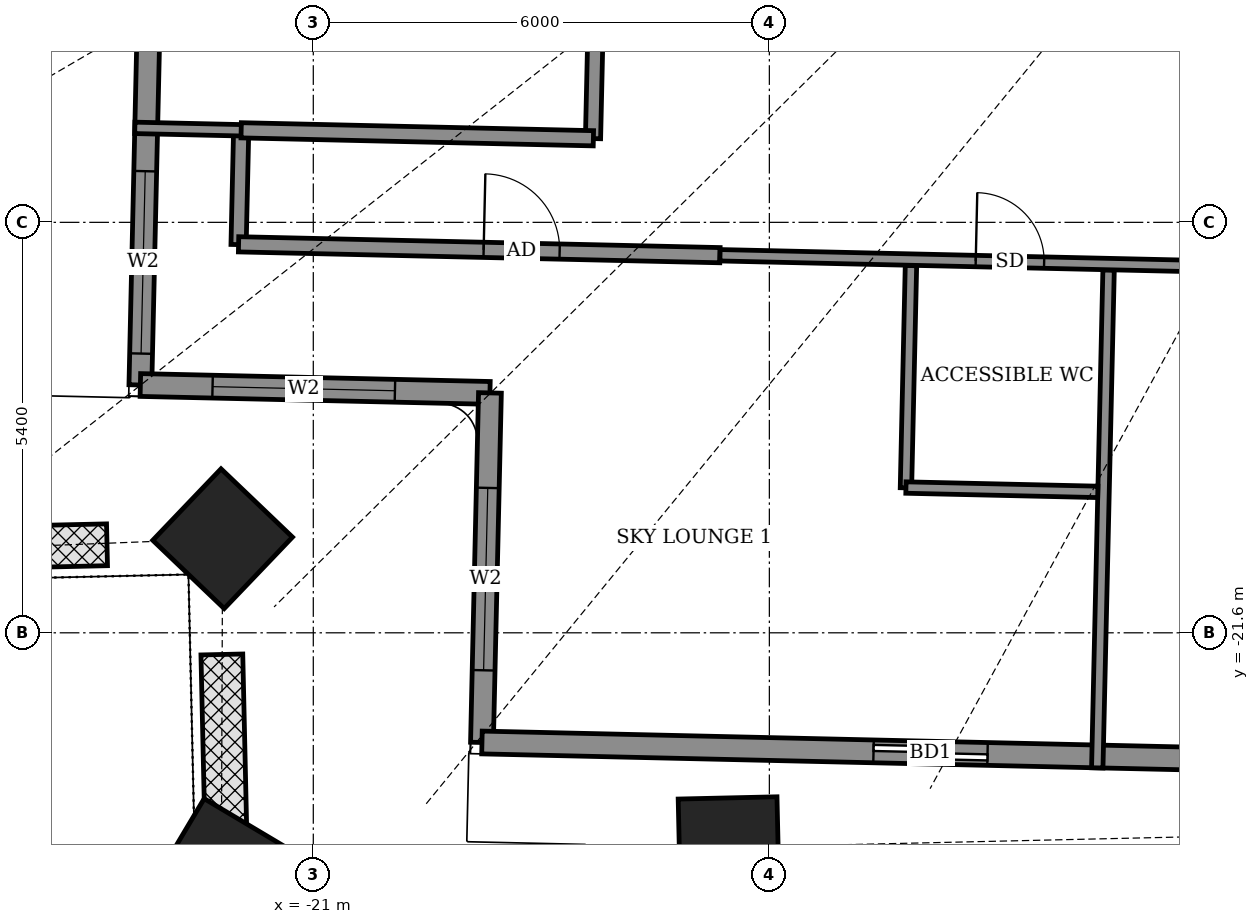
"""IFC4 building model, lengths in metres.
Left out: names, types, materials, properties, quantities, classifications, styles, units other than length and angle.
Written with IfcOpenShell. Run it as: python <this file> out.ifc"""

import sys

from ifc_helpers import new_model, si_unit, direction, frame, frame_2d, origin, origin_2d, place, context, subcontext, project, spatial, rectangle, extrude, element, fill, save


model = new_model("IFC4")
c1 = context("Model", 3, precision=1e-05, world=origin(), true_north=direction((0.0, 1.0)))
c2 = subcontext(c1, "Body", "Model", "MODEL_VIEW")
j1 = project(units=[si_unit("LENGTHUNIT", "METRE"), si_unit("PLANEANGLEUNIT", "RADIAN")], contexts=[c1])
p1 = place(None, origin())
s1 = spatial("IfcSite", under=j1, at=p1, CompositionType="ELEMENT")
p2 = place(p1, origin())
s2 = spatial("IfcBuilding", under=s1, at=p2, CompositionType="ELEMENT")
p3 = place(p2, frame((0.0, 0.0, 148.1)))
s3 = spatial("IfcBuildingStorey", under=s2, at=p3, CompositionType="ELEMENT", Elevation=148.1)
for number, where, z_axis, x_axis in (
    (1, (-22.193, -20.362, -0.55), (0.0, 0.0, 1.0), (0.723, -0.691, 0.0)),
    (2, (-22.209, -24.672, -0.55), (0.0, 0.0, 1.0), (0.859, -0.512, 0.0)),
    (3, (-15.535, -24.422, -0.55), (0.0, 0.0, 1.0), (1.0, 0.023, 0.0)),
):
    element("IfcColumn", number, at=place(p3, frame(where, z_axis=z_axis, x_axis=x_axis)), inside=s3, PredefinedType="COLUMN", context=c2, shape_type="SweptSolid", body=[
        extrude(rectangle(XDim=1.3, YDim=1.3, at=origin_2d()), origin(), (0.0, 0.0, 1.0), 4.6),
    ])
p4 = place(p3, frame((-23.038, -7.913, 0.0), z_axis=(0.0, 0.0, 1.0), x_axis=(-0.022705985163, -0.999742185885, 0.0)))
e4 = element("IfcWall", 4, at=p4, inside=s3, PredefinedType="SOLIDWALL", context=c2, shape_type="SweptSolid", body=[
    extrude(rectangle(XDim=10.43, YDim=0.3, at=frame_2d((5.215, 0.0))), origin(), (0.0, 0.0, 1.0), 2.55),
])
p5 = place(p4, frame((2.804, 0.0, 0.0)))
e5 = element("IfcOpeningElement", 5, at=p5, cuts=e4, PredefinedType="OPENING", context=c2, shape_type="SweptSolid", body=[
    extrude(rectangle(XDim=1.5, YDim=2.4, at=frame_2d((0.75, 1.2))), frame((0.0, 0.16, 0.0), z_axis=(0.0, -1.0, 0.0), x_axis=(1.0, 0.0, 0.0)), (0.0, 0.0, 1.0), 0.32),
])
p6 = place(p4, frame((7.616, 0.0, 0.9)))
e6 = element("IfcOpeningElement", 6, at=p6, cuts=e4, PredefinedType="OPENING", context=c2, shape_type="SweptSolid", body=[
    extrude(rectangle(XDim=2.4, YDim=1.5, at=frame_2d((1.2, 0.75))), frame((0.0, 0.16, 0.0), z_axis=(0.0, -1.0, 0.0), x_axis=(1.0, 0.0, 0.0)), (0.0, 0.0, 1.0), 0.32),
])
p7 = place(p3, frame((-23.275, -18.34, 0.0), z_axis=(0.0, 0.0, 1.0), x_axis=(0.999744377441, -0.022609285172, 0.0)))
e7 = element("IfcWall", 7, at=p7, inside=s3, PredefinedType="SOLIDWALL", context=c2, shape_type="SweptSolid", body=[
    extrude(rectangle(XDim=4.6, YDim=0.3, at=frame_2d((2.3, 0.0))), origin(), (0.0, 0.0, 1.0), 2.55),
])
p8 = place(p7, frame((0.95, 0.0, 0.9)))
e8 = element("IfcOpeningElement", 8, at=p8, cuts=e7, PredefinedType="OPENING", context=c2, shape_type="SweptSolid", body=[
    extrude(rectangle(XDim=2.4, YDim=1.5, at=frame_2d((1.2, 0.75))), frame((0.0, 0.16, 0.0), z_axis=(0.0, -1.0, 0.0), x_axis=(1.0, 0.0, 0.0)), (0.0, 0.0, 1.0), 0.32),
])
p9 = place(p3, frame((-18.676, -18.444, 0.0), z_axis=(0.0, 0.0, 1.0), x_axis=(-0.022821468877, -0.999739556364, 0.0)))
e9 = element("IfcWall", 9, at=p9, inside=s3, PredefinedType="SOLIDWALL", context=c2, shape_type="SweptSolid", body=[
    extrude(rectangle(XDim=4.6, YDim=0.3, at=frame_2d((2.3, 0.0))), origin(), (0.0, 0.0, 1.0), 2.45),
])
p10 = place(p9, frame((1.25, 0.0, 0.9)))
e10 = element("IfcOpeningElement", 10, at=p10, cuts=e9, PredefinedType="OPENING", context=c2, shape_type="SweptSolid", body=[
    extrude(rectangle(XDim=2.4, YDim=1.5, at=frame_2d((1.2, 0.75))), frame((0.0, 0.16, 0.0), z_axis=(0.0, -1.0, 0.0), x_axis=(1.0, 0.0, 0.0)), (0.0, 0.0, 1.0), 0.32),
])
p11 = place(p3, frame((-18.781, -23.043, 0.0), z_axis=(0.0, 0.0, 1.0), x_axis=(0.999742794992, -0.022679150367, 0.0)))
e11 = element("IfcWall", 11, at=p11, inside=s3, PredefinedType="SOLIDWALL", context=c2, shape_type="SweptSolid", body=[
    extrude(rectangle(XDim=38.98, YDim=0.3, at=frame_2d((19.49, 0.0))), origin(), (0.0, 0.0, 1.0), 2.45),
])
p12 = place(p11, frame((5.153, 0.0, 0.0)))
e12 = element("IfcOpeningElement", 12, at=p12, cuts=e11, PredefinedType="OPENING", context=c2, shape_type="SweptSolid", body=[
    extrude(rectangle(XDim=1.5, YDim=2.4, at=frame_2d((0.75, 1.2))), frame((0.0, 0.16, 0.0), z_axis=(0.0, -1.0, 0.0), x_axis=(1.0, 0.0, 0.0)), (0.0, 0.0, 1.0), 0.32),
])
p13 = place(p11, frame((11.086, 0.0, 0.9)))
e13 = element("IfcOpeningElement", 13, at=p13, cuts=e11, PredefinedType="OPENING", context=c2, shape_type="SweptSolid", body=[
    extrude(rectangle(XDim=1.2, YDim=1.5, at=frame_2d((0.6, 0.75))), frame((0.0, 0.16, 0.0), z_axis=(0.0, -1.0, 0.0), x_axis=(1.0, 0.0, 0.0)), (0.0, 0.0, 1.0), 0.32),
])
p14 = place(p11, frame((13.99, 0.0, 0.0)))
e14 = element("IfcOpeningElement", 14, at=p14, cuts=e11, PredefinedType="OPENING", context=c2, shape_type="SweptSolid", body=[
    extrude(rectangle(XDim=1.5, YDim=2.4, at=frame_2d((0.75, 1.2))), frame((0.0, 0.16, 0.0), z_axis=(0.0, -1.0, 0.0), x_axis=(1.0, 0.0, 0.0)), (0.0, 0.0, 1.0), 0.32),
])
p15 = place(p11, frame((19.869, 0.0, 0.0)))
e15 = element("IfcOpeningElement", 15, at=p15, cuts=e11, PredefinedType="OPENING", context=c2, shape_type="SweptSolid", body=[
    extrude(rectangle(XDim=1.5, YDim=2.4, at=frame_2d((0.75, 1.2))), frame((0.0, 0.16, 0.0), z_axis=(0.0, -1.0, 0.0), x_axis=(1.0, 0.0, 0.0)), (0.0, 0.0, 1.0), 0.32),
])
p16 = place(p11, frame((26.635, 0.0, 0.9)))
e16 = element("IfcOpeningElement", 16, at=p16, cuts=e11, PredefinedType="OPENING", context=c2, shape_type="SweptSolid", body=[
    extrude(rectangle(XDim=2.4, YDim=1.5, at=frame_2d((1.2, 0.75))), frame((0.0, 0.16, 0.0), z_axis=(0.0, -1.0, 0.0), x_axis=(1.0, 0.0, 0.0)), (0.0, 0.0, 1.0), 0.32),
])
p17 = place(p11, frame((33.344, 0.0, 0.9)))
e17 = element("IfcOpeningElement", 17, at=p17, cuts=e11, PredefinedType="OPENING", context=c2, shape_type="SweptSolid", body=[
    extrude(rectangle(XDim=2.4, YDim=1.5, at=frame_2d((1.2, 0.75))), frame((0.0, 0.16, 0.0), z_axis=(0.0, -1.0, 0.0), x_axis=(1.0, 0.0, 0.0)), (0.0, 0.0, 1.0), 0.32),
])
p18 = place(p3, frame((-22.147, -24.372, 0.0), z_axis=(0.0, 0.0, 1.0), x_axis=(-0.022473953195, 0.999747428818, 0.0)))
e18 = element("IfcWall", 18, at=p18, inside=s3, PredefinedType="USERDEFINED", context=c2, shape_type="SweptSolid", body=[
    extrude(rectangle(XDim=2.488, YDim=0.55, at=frame_2d((1.244, 0.0))), origin(), (0.0, 0.0, 1.0), 0.8),
])
p19 = place(p3, frame((-23.714, -20.442, 0.0), z_axis=(0.0, 0.0, 1.0), x_axis=(-0.999745168975, -0.022574257693, 0.0)))
e19 = element("IfcWall", 19, at=p19, inside=s3, PredefinedType="USERDEFINED", context=c2, shape_type="SweptSolid", body=[
    extrude(rectangle(XDim=2.488, YDim=0.55, at=frame_2d((1.244, 0.0))), origin(), (0.0, 0.0, 1.0), 0.8),
])
p20 = place(p3, frame((-10.686, -23.377, 0.0), z_axis=(0.0, 0.0, 1.0), x_axis=(0.022734104141, 0.999741546855, 0.0)))
e20 = element("IfcWall", 20, at=p20, inside=s3, PredefinedType="PARTITIONING", context=c2, shape_type="SweptSolid", body=[
    extrude(rectangle(XDim=6.551, YDim=0.15, at=frame_2d((3.275, 0.0))), origin(), (0.0, 0.0, 1.0), 2.65),
])
p21 = place(p3, frame((-13.203, -19.693, 0.0), z_axis=(0.0, 0.0, 1.0), x_axis=(0.022537481811, 0.999745998698, 0.0)))
e21 = element("IfcWall", 21, at=p21, inside=s3, PredefinedType="PARTITIONING", context=c2, shape_type="SweptSolid", body=[
    extrude(rectangle(XDim=2.925, YDim=0.15, at=frame_2d((1.462, 0.0))), origin(), (0.0, 0.0, 1.0), 2.45),
])
p22 = place(p3, frame((-13.203, -19.689, 0.0), z_axis=(0.0, 0.0, 1.0), x_axis=(0.99974392816, -0.022629142889, 0.0)))
e22 = element("IfcWall", 22, at=p22, inside=s3, PredefinedType="PARTITIONING", context=c2, shape_type="SweptSolid", body=[
    extrude(rectangle(XDim=2.525, YDim=0.15, at=frame_2d((1.262, 0.0))), origin(), (0.0, 0.0, 1.0), 2.65),
])
p23 = place(p3, frame((-21.983, -16.493, 0.0), z_axis=(0.0, 0.0, 1.0), x_axis=(0.022617910375, 0.999744182344, 0.0)))
e23 = element("IfcWall", 23, at=p23, inside=s3, PredefinedType="PARTITIONING", context=c2, shape_type="SweptSolid", body=[
    extrude(rectangle(XDim=1.5, YDim=0.2, at=frame_2d((0.75, 0.0))), origin(), (0.0, 0.0, 1.0), 2.55),
])
p24 = place(p3, frame((-21.983, -16.489, 0.0), z_axis=(0.0, 0.0, 1.0), x_axis=(0.999744930163, -0.022584831499, 0.0)))
e24 = element("IfcWall", 24, at=p24, inside=s3, PredefinedType="PARTITIONING", context=c2, shape_type="SweptSolid", body=[
    extrude(rectangle(XDim=6.335, YDim=0.2, at=frame_2d((3.167, 0.0))), origin(), (0.0, 0.0, 1.0), 2.55),
])
p25 = place(p24, frame((3.225, 0.0, 0.0)))
e25 = element("IfcOpeningElement", 25, at=p25, cuts=e24, PredefinedType="OPENING", context=c2, shape_type="SweptSolid", body=[
    extrude(rectangle(XDim=1.0, YDim=2.1, at=frame_2d((0.5, 1.05))), frame((0.0, 0.11, 0.0), z_axis=(0.0, -1.0, 0.0), x_axis=(1.0, 0.0, 0.0)), (0.0, 0.0, 1.0), 0.22),
])
p26 = place(p3, frame((-15.649, -16.633, 0.0), z_axis=(0.0, 0.0, 1.0), x_axis=(0.999742978268, -0.022671069754, 0.0)))
e26 = element("IfcWall", 26, at=p26, inside=s3, PredefinedType="PARTITIONING", context=c2, shape_type="SweptSolid", body=[
    extrude(rectangle(XDim=30.519, YDim=0.15, at=frame_2d((15.259, 0.0))), origin(), (0.0, 0.0, 1.0), 2.45),
])
p27 = place(p26, frame((3.365, 0.0, 0.0)))
e27 = element("IfcOpeningElement", 27, at=p27, cuts=e26, PredefinedType="OPENING", context=c2, shape_type="SweptSolid", body=[
    extrude(rectangle(XDim=0.9, YDim=2.1, at=frame_2d((0.45, 1.05))), frame((0.0, 0.085, 0.0), z_axis=(0.0, -1.0, 0.0), x_axis=(1.0, 0.0, 0.0)), (0.0, 0.0, 1.0), 0.17),
])
p28 = place(p26, frame((6.865, 0.0, 0.0)))
e28 = element("IfcOpeningElement", 28, at=p28, cuts=e26, PredefinedType="OPENING", context=c2, shape_type="SweptSolid", body=[
    extrude(rectangle(XDim=1.0, YDim=2.1, at=frame_2d((0.5, 1.05))), frame((0.0, 0.085, 0.0), z_axis=(0.0, -1.0, 0.0), x_axis=(1.0, 0.0, 0.0)), (0.0, 0.0, 1.0), 0.17),
])
p29 = place(p26, frame((10.44, 0.0, 0.0)))
e29 = element("IfcOpeningElement", 29, at=p29, cuts=e26, PredefinedType="OPENING", context=c2, shape_type="SweptSolid", body=[
    extrude(rectangle(XDim=0.9, YDim=2.1, at=frame_2d((0.45, 1.05))), frame((0.0, 0.085, 0.0), z_axis=(0.0, -1.0, 0.0), x_axis=(1.0, 0.0, 0.0)), (0.0, 0.0, 1.0), 0.17),
])
p30 = place(p26, frame((18.34, 0.0, 0.0)))
e30 = element("IfcOpeningElement", 30, at=p30, cuts=e26, PredefinedType="OPENING", context=c2, shape_type="SweptSolid", body=[
    extrude(rectangle(XDim=1.0, YDim=2.1, at=frame_2d((0.5, 1.05))), frame((0.0, 0.085, 0.0), z_axis=(0.0, -1.0, 0.0), x_axis=(1.0, 0.0, 0.0)), (0.0, 0.0, 1.0), 0.17),
])
p31 = place(p26, frame((15.415, 0.0, 0.0)))
e31 = element("IfcOpeningElement", 31, at=p31, cuts=e26, PredefinedType="OPENING", context=c2, shape_type="SweptSolid", body=[
    extrude(rectangle(XDim=0.9, YDim=2.1, at=frame_2d((0.45, 1.05))), frame((0.0, 0.085, 0.0), z_axis=(0.0, -1.0, 0.0), x_axis=(1.0, 0.0, 0.0)), (0.0, 0.0, 1.0), 0.17),
])
p32 = place(p26, frame((22.515, 0.0, 0.0)))
e32 = element("IfcOpeningElement", 32, at=p32, cuts=e26, PredefinedType="OPENING", context=c2, shape_type="SweptSolid", body=[
    extrude(rectangle(XDim=1.0, YDim=2.1, at=frame_2d((0.5, 1.05))), frame((0.0, 0.085, 0.0), z_axis=(0.0, -1.0, 0.0), x_axis=(1.0, 0.0, 0.0)), (0.0, 0.0, 1.0), 0.17),
])
p33 = place(p26, frame((26.265, 0.0, 0.0)))
e33 = element("IfcOpeningElement", 33, at=p33, cuts=e26, PredefinedType="OPENING", context=c2, shape_type="SweptSolid", body=[
    extrude(rectangle(XDim=0.9, YDim=2.1, at=frame_2d((0.45, 1.05))), frame((0.0, 0.085, 0.0), z_axis=(0.0, -1.0, 0.0), x_axis=(1.0, 0.0, 0.0)), (0.0, 0.0, 1.0), 0.17),
])
p34 = place(p26, frame((28.765, 0.0, 0.0)))
e34 = element("IfcOpeningElement", 34, at=p34, cuts=e26, PredefinedType="OPENING", context=c2, shape_type="SweptSolid", body=[
    extrude(rectangle(XDim=0.9, YDim=2.1, at=frame_2d((0.45, 1.05))), frame((0.0, 0.085, 0.0), z_axis=(0.0, -1.0, 0.0), x_axis=(1.0, 0.0, 0.0)), (0.0, 0.0, 1.0), 0.17),
])
p35 = place(p3, frame((-17.32, -15.098, 0.0), z_axis=(0.0, 0.0, 1.0), x_axis=(0.022694293906, 0.999742451346, 0.0)))
e35 = element("IfcWall", 35, at=p35, inside=s3, PredefinedType="PARTITIONING", context=c2, shape_type="SweptSolid", body=[
    extrude(rectangle(XDim=28.024, YDim=0.2, at=frame_2d((14.012, 0.0))), origin(), (0.0, 0.0, 1.0), 2.55),
])
p36 = place(p35, frame((22.587, 0.0, 0.0)))
e36 = element("IfcOpeningElement", 36, at=p36, cuts=e35, PredefinedType="OPENING", context=c2, shape_type="SweptSolid", body=[
    extrude(rectangle(XDim=1.0, YDim=2.1, at=frame_2d((0.5, 1.05))), frame((0.0, 0.11, 0.0), z_axis=(0.0, -1.0, 0.0), x_axis=(1.0, 0.0, 0.0)), (0.0, 0.0, 1.0), 0.22),
])
p37 = place(p35, frame((26.274, 0.0, 0.0)))
e37 = element("IfcOpeningElement", 37, at=p37, cuts=e35, PredefinedType="OPENING", context=c2, shape_type="SweptSolid", body=[
    extrude(rectangle(XDim=0.9, YDim=2.1, at=frame_2d((0.45, 1.05))), frame((0.0, 0.11, 0.0), z_axis=(0.0, -1.0, 0.0), x_axis=(1.0, 0.0, 0.0)), (0.0, 0.0, 1.0), 0.22),
])
p38 = place(p35, frame((15.049, 0.0, 0.0)))
e38 = element("IfcOpeningElement", 38, at=p38, cuts=e35, PredefinedType="OPENING", context=c2, shape_type="SweptSolid", body=[
    extrude(rectangle(XDim=1.0, YDim=2.1, at=frame_2d((0.5, 1.05))), frame((0.0, 0.11, 0.0), z_axis=(0.0, -1.0, 0.0), x_axis=(1.0, 0.0, 0.0)), (0.0, 0.0, 1.0), 0.22),
])
p39 = place(p35, frame((19.099, 0.0, 0.0)))
e39 = element("IfcOpeningElement", 39, at=p39, cuts=e35, PredefinedType="OPENING", context=c2, shape_type="SweptSolid", body=[
    extrude(rectangle(XDim=0.9, YDim=2.1, at=frame_2d((0.45, 1.05))), frame((0.0, 0.11, 0.0), z_axis=(0.0, -1.0, 0.0), x_axis=(1.0, 0.0, 0.0)), (0.0, 0.0, 1.0), 0.22),
])
p40 = place(p35, frame((9.543, 0.0, 0.0)))
e40 = element("IfcOpeningElement", 40, at=p40, cuts=e35, PredefinedType="OPENING", context=c2, shape_type="SweptSolid", body=[
    extrude(rectangle(XDim=1.0, YDim=2.1, at=frame_2d((0.5, 1.05))), frame((0.0, 0.11, 0.0), z_axis=(0.0, -1.0, 0.0), x_axis=(1.0, 0.0, 0.0)), (0.0, 0.0, 1.0), 0.22),
])
p41 = place(p35, frame((2.999, 0.0, 0.0)))
e41 = element("IfcOpeningElement", 41, at=p41, cuts=e35, PredefinedType="OPENING", context=c2, shape_type="SweptSolid", body=[
    extrude(rectangle(XDim=1.0, YDim=2.1, at=frame_2d((0.5, 1.05))), frame((0.0, 0.11, 0.0), z_axis=(0.0, -1.0, 0.0), x_axis=(1.0, 0.0, 0.0)), (0.0, 0.0, 1.0), 0.22),
])
p42 = place(p3, frame((-23.348, -14.957, 0.0), z_axis=(0.0, 0.0, 1.0), x_axis=(0.999740216184, -0.022792545827, 0.0)))
e42 = element("IfcWall", 42, at=p42, inside=s3, PredefinedType="PARTITIONING", context=c2, shape_type="SweptSolid", body=[
    extrude(rectangle(XDim=1.403, YDim=0.15, at=frame_2d((0.702, 0.0))), origin(), (0.0, 0.0, 1.0), 4.05),
])
p43 = place(p3, frame((-21.949, -14.989, 0.0), z_axis=(0.0, 0.0, 1.0), x_axis=(0.999743491588, -0.022648422179, 0.0)))
e43 = element("IfcWall", 43, at=p43, inside=s3, PredefinedType="PARTITIONING", context=c2, shape_type="SweptSolid", body=[
    extrude(rectangle(XDim=4.635, YDim=0.2, at=frame_2d((2.318, 0.0))), origin(), (0.0, 0.0, 1.0), 2.55),
])
p44 = place(p6, origin())
e44 = element("IfcWindow", 44, at=p44, inside=s3, PartitioningType="DOUBLE_PANEL_VERTICAL", PredefinedType="WINDOW", context=c2, shape_type="SweptSolid", body=[
    extrude(rectangle(XDim=2.4, YDim=1.5, at=frame_2d((1.2, 0.75))), frame((0.0, 0.03, 0.0), z_axis=(0.0, -1.0, 0.0), x_axis=(1.0, 0.0, 0.0)), (0.0, 0.0, 1.0), 0.06),
])
fill(e6, e44)
p45 = place(p8, origin())
e45 = element("IfcWindow", 45, at=p45, inside=s3, PartitioningType="DOUBLE_PANEL_VERTICAL", PredefinedType="WINDOW", context=c2, shape_type="SweptSolid", body=[
    extrude(rectangle(XDim=2.4, YDim=1.5, at=frame_2d((1.2, 0.75))), frame((0.0, 0.03, 0.0), z_axis=(0.0, -1.0, 0.0), x_axis=(1.0, 0.0, 0.0)), (0.0, 0.0, 1.0), 0.06),
])
fill(e8, e45)
p46 = place(p10, origin())
e46 = element("IfcWindow", 46, at=p46, inside=s3, PartitioningType="DOUBLE_PANEL_VERTICAL", PredefinedType="WINDOW", context=c2, shape_type="SweptSolid", body=[
    extrude(rectangle(XDim=2.4, YDim=1.5, at=frame_2d((1.2, 0.75))), frame((0.0, 0.03, 0.0), z_axis=(0.0, -1.0, 0.0), x_axis=(1.0, 0.0, 0.0)), (0.0, 0.0, 1.0), 0.06),
])
fill(e10, e46)
p47 = place(p12, origin())
e47 = element("IfcDoor", 47, at=p47, inside=s3, OperationType="SLIDING_TO_LEFT", PredefinedType="DOOR", context=c2, shape_type="SweptSolid", body=[
    extrude(rectangle(XDim=1.5, YDim=2.4, at=frame_2d((0.75, 1.2))), frame((0.0, 0.025, 0.0), z_axis=(0.0, -1.0, 0.0), x_axis=(1.0, 0.0, 0.0)), (0.0, 0.0, 1.0), 0.05),
])
fill(e12, e47)
p48 = place(p25, origin())
e48 = element("IfcDoor", 48, at=p48, inside=s3, OperationType="SINGLE_SWING_LEFT", PredefinedType="DOOR", context=c2, shape_type="SweptSolid", body=[
    extrude(rectangle(XDim=1.0, YDim=2.1, at=frame_2d((0.5, 1.05))), frame((0.0, 0.025, 0.0), z_axis=(0.0, -1.0, 0.0), x_axis=(1.0, 0.0, 0.0)), (0.0, 0.0, 1.0), 0.05),
])
fill(e25, e48)
p49 = place(p27, origin())
e49 = element("IfcDoor", 49, at=p49, inside=s3, OperationType="SINGLE_SWING_LEFT", PredefinedType="DOOR", context=c2, shape_type="SweptSolid", body=[
    extrude(rectangle(XDim=0.9, YDim=2.1, at=frame_2d((0.45, 1.05))), frame((0.0, 0.025, 0.0), z_axis=(0.0, -1.0, 0.0), x_axis=(1.0, 0.0, 0.0)), (0.0, 0.0, 1.0), 0.05),
])
fill(e27, e49)
save(model, sys.argv[1])
